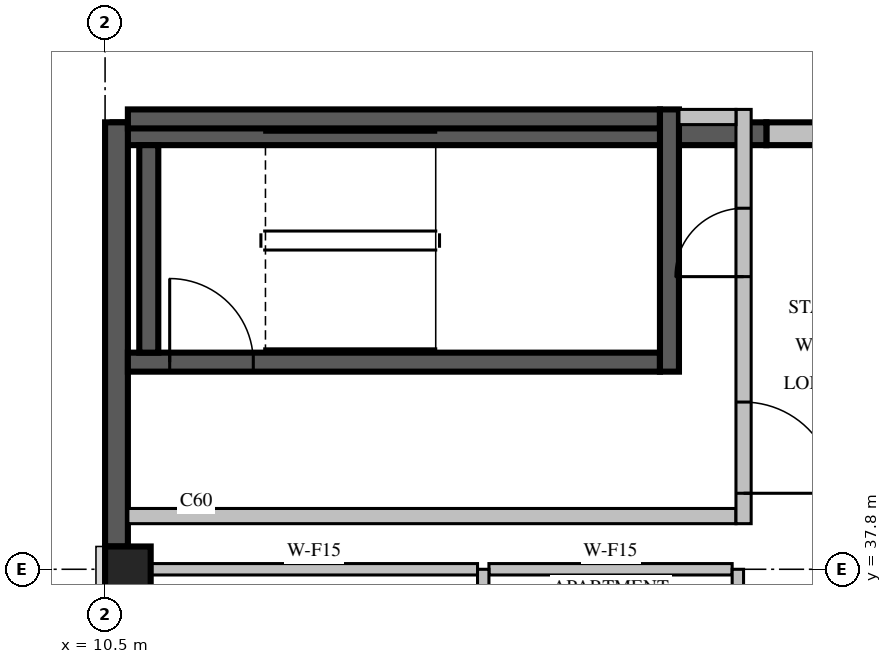
"""IFC4 building model, lengths in metres.
Left out: names, types, materials, properties, quantities, classifications, styles, units other than length and angle.
Written with IfcOpenShell. Run it as: python <this file> out.ifc"""

import sys

from ifc_helpers import new_model, si_unit, direction, frame, frame_2d, origin, origin_2d, place, context, subcontext, project, spatial, rectangle, extrude, source, transform, mapped, element, fill, save


model = new_model("IFC4")
c1 = context("Model", 3, precision=1e-05, world=origin(), true_north=direction((0.0, 1.0)))
c2 = subcontext(c1, "Body", "Model", "MODEL_VIEW")
j1 = project(units=[si_unit("LENGTHUNIT", "METRE"), si_unit("PLANEANGLEUNIT", "RADIAN")], contexts=[c1])
p1 = place(None, origin())
s1 = spatial("IfcSite", under=j1, at=p1, CompositionType="ELEMENT")
p2 = place(p1, origin())
s2 = spatial("IfcBuilding", under=s1, at=p2, CompositionType="ELEMENT")
p3 = place(p2, frame((0.0, 0.0, 365.0)))
s3 = spatial("IfcBuildingStorey", under=s2, at=p3, CompositionType="ELEMENT", Elevation=365.0)
m1 = source(origin(), c2, "Body", "SweptSolid", [
    extrude(rectangle(XDim=0.6, YDim=0.6, at=origin_2d()), origin(), (0.0, 0.0, 1.0), 3.5),
])
p4 = place(p3, frame((10.8, 37.8, 0.0), z_axis=(0.0, 0.0, 1.0), x_axis=(1.0, 0.0, 0.0)))
e1 = element("IfcColumn", 1, at=p4, inside=s3, PredefinedType="COLUMN", context=c2, shape_type="MappedRepresentation", body=[
    mapped(m1, transform((0.0, 0.0, 0.0), scale=1.0)),
])
p5 = place(p3, frame((21.0, 43.53, 0.0), z_axis=(0.0, 0.0, 1.0), x_axis=(-1.0, 0.0, 0.0)))
e2 = element("IfcWall", 2, at=p5, inside=s3, PredefinedType="STANDARD", context=c2, shape_type="SweptSolid", body=[
    extrude(rectangle(XDim=1.8, YDim=0.3, at=frame_2d((0.9, 0.0))), origin(), (0.0, 0.0, 1.0), 3.05),
])
p6 = place(p3, frame((19.2, 43.53, 0.0), z_axis=(0.0, 0.0, 1.0), x_axis=(-1.0, 0.0, 0.0)))
e3 = element("IfcWall", 3, at=p6, inside=s3, PredefinedType="SOLIDWALL", context=c2, shape_type="SweptSolid", body=[
    extrude(rectangle(XDim=8.6, YDim=0.3, at=frame_2d((4.3, 0.0))), origin(), (0.0, 0.0, 1.0), 3.05),
])
p7 = place(p3, frame((10.65, 43.68, 0.0), z_axis=(0.0, 0.0, 1.0), x_axis=(0.0, -1.0, 0.0)))
e4 = element("IfcWall", 4, at=p7, inside=s3, PredefinedType="SOLIDWALL", context=c2, shape_type="SweptSolid", body=[
    extrude(rectangle(XDim=5.58, YDim=0.3, at=frame_2d((2.79, 0.0))), origin(), (0.0, 0.0, 1.0), 3.05),
])
m2 = source(origin(), c2, "Body", "SweptSolid", [
    extrude(rectangle(XDim=7.0, YDim=0.25, at=frame_2d((3.5, 0.0))), origin(), (0.0, 0.0, 1.0), 3.05),
])
p8 = place(p3, frame((10.8, 40.525, 0.0), z_axis=(0.0, 0.0, 1.0), x_axis=(1.0, 0.0, 0.0)))
e5 = element("IfcWall", 5, at=p8, inside=s3, PredefinedType="SOLIDWALL", context=c2, shape_type="MappedRepresentation", body=[
    mapped(m2, transform((0.0, 0.0, 0.0), scale=1.0)),
])
m3 = source(origin(), c2, "Body", "SweptSolid", [
    extrude(rectangle(XDim=1.1, YDim=2.1, at=frame_2d((0.55, 1.05))), frame((0.0, 0.135, 0.0), z_axis=(0.0, -1.0, 0.0), x_axis=(1.0, 0.0, 0.0)), (0.0, 0.0, 1.0), 0.27),
])
p9 = place(p8, frame((0.55, 0.0, 0.0)))
e6 = element("IfcOpeningElement", 6, at=p9, cuts=e5, PredefinedType="OPENING", context=c2, shape_type="MappedRepresentation", body=[
    mapped(m3, transform((0.0, 0.0, 0.0), scale=1.0)),
])
p10 = place(p3, frame((10.8, 43.725, 0.0), z_axis=(0.0, 0.0, 1.0), x_axis=(1.0, 0.0, 0.0)))
e7 = element("IfcWall", 7, at=p10, inside=s3, PredefinedType="SOLIDWALL", context=c2, shape_type="MappedRepresentation", body=[
    mapped(m2, transform((0.0, 0.0, 0.0), scale=1.0)),
])
m4 = source(origin(), c2, "Body", "SweptSolid", [
    extrude(rectangle(XDim=3.45, YDim=0.25, at=frame_2d((1.725, 0.0))), origin(), (0.0, 0.0, 1.0), 3.05),
])
p11 = place(p3, frame((17.925, 40.4, 0.0), z_axis=(0.0, 0.0, 1.0), x_axis=(0.0, 1.0, 0.0)))
e8 = element("IfcWall", 8, at=p11, inside=s3, PredefinedType="SOLIDWALL", context=c2, shape_type="MappedRepresentation", body=[
    mapped(m4, transform((0.0, 0.0, 0.0), scale=1.0)),
])
p12 = place(p3, frame((11.075, 40.65, 0.0), z_axis=(0.0, 0.0, 1.0), x_axis=(0.0, 1.0, 0.0)))
e9 = element("IfcWall", 9, at=p12, inside=s3, PredefinedType="SOLIDWALL", context=c2, shape_type="SweptSolid", body=[
    extrude(rectangle(XDim=2.73, YDim=0.25, at=frame_2d((1.365, 0.0))), origin(), (0.0, 0.0, 1.0), 3.05),
])
m5 = source(origin(), c2, "Body", "SweptSolid", [
    extrude(rectangle(XDim=8.0, YDim=0.2, at=frame_2d((4.0, 0.0))), origin(), (0.0, 0.0, 1.0), 3.05),
])
p13 = place(p3, frame((10.8, 38.5, 0.0), z_axis=(0.0, 0.0, 1.0), x_axis=(1.0, 0.0, 0.0)))
e10 = element("IfcWall", 10, at=p13, inside=s3, PredefinedType="PARTITIONING", context=c2, shape_type="MappedRepresentation", body=[
    mapped(m5, transform((0.0, 0.0, 0.0), scale=1.0)),
])
m6 = source(origin(), c2, "Body", "SweptSolid", [
    extrude(rectangle(XDim=5.45, YDim=0.2, at=frame_2d((2.725, 0.0))), origin(), (0.0, 0.0, 1.0), 3.05),
])
p14 = place(p3, frame((18.9, 38.4, 0.0), z_axis=(0.0, 0.0, 1.0), x_axis=(0.0, 1.0, 0.0)))
e11 = element("IfcWall", 11, at=p14, inside=s3, PredefinedType="PARTITIONING", context=c2, shape_type="MappedRepresentation", body=[
    mapped(m6, transform((0.0, 0.0, 0.0), scale=1.0)),
])
m7 = source(origin(), c2, "Body", "SweptSolid", [
    extrude(rectangle(XDim=1.2, YDim=2.1, at=frame_2d((0.6, 1.05))), frame((0.0, 0.11, 0.0), z_axis=(0.0, -1.0, 0.0), x_axis=(1.0, 0.0, 0.0)), (0.0, 0.0, 1.0), 0.22),
])
p15 = place(p14, frame((0.4, 0.0, 0.0)))
e12 = element("IfcOpeningElement", 12, at=p15, cuts=e11, PredefinedType="OPENING", context=c2, shape_type="MappedRepresentation", body=[
    mapped(m7, transform((0.0, 0.0, 0.0), scale=1.0)),
])
m8 = source(origin(), c2, "Body", "SweptSolid", [
    extrude(rectangle(XDim=0.9, YDim=2.1, at=frame_2d((0.45, 1.05))), frame((0.0, 0.11, 0.0), z_axis=(0.0, -1.0, 0.0), x_axis=(1.0, 0.0, 0.0)), (0.0, 0.0, 1.0), 0.22),
])
p16 = place(p14, frame((3.25, 0.0, 0.0)))
e13 = element("IfcOpeningElement", 13, at=p16, cuts=e11, PredefinedType="OPENING", context=c2, shape_type="MappedRepresentation", body=[
    mapped(m8, transform((0.0, 0.0, 0.0), scale=1.0)),
])
m9 = source(origin(), c2, "Body", "SweptSolid", [
    extrude(rectangle(XDim=0.75, YDim=0.2, at=frame_2d((0.375, 0.0))), origin(), (0.0, 0.0, 1.0), 3.05),
])
p17 = place(p3, frame((18.05, 43.75, 0.0), z_axis=(0.0, 0.0, 1.0), x_axis=(1.0, 0.0, 0.0)))
e14 = element("IfcWall", 14, at=p17, inside=s3, PredefinedType="PARTITIONING", context=c2, shape_type="MappedRepresentation", body=[
    mapped(m9, transform((0.0, 0.0, 0.0), scale=1.0)),
])
m10 = source(origin(), c2, "Body", "SweptSolid", [
    extrude(rectangle(XDim=4.301, YDim=0.15, at=frame_2d((2.151, 0.0))), origin(), (0.0, 0.0, 1.0), 3.05),
])
p18 = place(p3, frame((15.4, 37.8, 0.0), z_axis=(0.0, 0.0, 1.0), x_axis=(-1.0, 0.0, 0.0)))
e15 = element("IfcWall", 15, at=p18, inside=s3, PredefinedType="PARTITIONING", context=c2, shape_type="MappedRepresentation", body=[
    mapped(m10, transform((0.0, 0.0, 0.0), scale=1.0)),
])
m11 = source(origin(), c2, "Body", "SweptSolid", [
    extrude(rectangle(XDim=3.2, YDim=0.15, at=frame_2d((1.6, 0.0))), origin(), (0.0, 0.0, 1.0), 3.05),
])
p19 = place(p3, frame((18.75, 37.8, 0.0), z_axis=(0.0, 0.0, 1.0), x_axis=(-1.0, 0.0, 0.0)))
e16 = element("IfcWall", 16, at=p19, inside=s3, PredefinedType="PARTITIONING", context=c2, shape_type="MappedRepresentation", body=[
    mapped(m11, transform((0.0, 0.0, 0.0), scale=1.0)),
])
m12 = source(origin(), c2, "Body", "SweptSolid", [
    extrude(rectangle(XDim=8.4, YDim=0.15, at=frame_2d((4.2, 0.0))), origin(), (0.0, 0.0, 1.0), 3.05),
])
p20 = place(p3, frame((15.475, 29.4, 0.0), z_axis=(0.0, 0.0, 1.0), x_axis=(0.0, 1.0, 0.0)))
e17 = element("IfcWall", 17, at=p20, inside=s3, PredefinedType="PARTITIONING", context=c2, shape_type="MappedRepresentation", body=[
    mapped(m12, transform((0.0, 0.0, 0.0), scale=1.0)),
])
m13 = source(origin(), c2, "Body", "SweptSolid", [
    extrude(rectangle(XDim=1.0, YDim=2.1, at=frame_2d((0.5, 1.05))), frame((0.0, 0.085, 0.0), z_axis=(0.0, -1.0, 0.0), x_axis=(1.0, 0.0, 0.0)), (0.0, 0.0, 1.0), 0.17),
])
p21 = place(p20, frame((3.068, 0.0, 0.0)))
e18 = element("IfcOpeningElement", 18, at=p21, cuts=e17, PredefinedType="OPENING", context=c2, shape_type="MappedRepresentation", body=[
    mapped(m13, transform((0.0, 0.0, 0.0), scale=1.0)),
])
m14 = source(origin(), c2, "Body", "SweptSolid", [
    extrude(rectangle(XDim=0.9, YDim=2.1, at=frame_2d((0.45, 1.05))), frame((0.0, 0.085, 0.0), z_axis=(0.0, -1.0, 0.0), x_axis=(1.0, 0.0, 0.0)), (0.0, 0.0, 1.0), 0.17),
])
p22 = place(p20, frame((1.067, 0.0, 0.0)))
e19 = element("IfcOpeningElement", 19, at=p22, cuts=e17, PredefinedType="OPENING", context=c2, shape_type="MappedRepresentation", body=[
    mapped(m14, transform((0.0, 0.0, 0.0), scale=1.0)),
])
p23 = place(p20, frame((7.252, 0.0, 0.0)))
e20 = element("IfcOpeningElement", 20, at=p23, cuts=e17, PredefinedType="OPENING", context=c2, shape_type="MappedRepresentation", body=[
    mapped(m14, transform((0.0, 0.0, 0.0), scale=1.0)),
])
p24 = place(p3, frame((18.825, 29.4, 0.0), z_axis=(0.0, 0.0, 1.0), x_axis=(0.0, 1.0, 0.0)))
e21 = element("IfcWall", 21, at=p24, inside=s3, PredefinedType="PARTITIONING", context=c2, shape_type="MappedRepresentation", body=[
    mapped(m12, transform((0.0, 0.0, 0.0), scale=1.0)),
])
p25 = place(p24, frame((3.467, 0.0, 0.0)))
e22 = element("IfcOpeningElement", 22, at=p25, cuts=e21, PredefinedType="OPENING", context=c2, shape_type="MappedRepresentation", body=[
    mapped(m13, transform((0.0, 0.0, 0.0), scale=1.0)),
])
m15 = source(origin(), c2, "Body", "SweptSolid", [
    extrude(rectangle(XDim=1.1, YDim=2.1, at=frame_2d((0.55, 1.05))), frame((0.0, 0.025, 0.0), z_axis=(0.0, -1.0, 0.0), x_axis=(1.0, 0.0, 0.0)), (0.0, 0.0, 1.0), 0.05),
])
p26 = place(p9, origin())
e23 = element("IfcDoor", 23, at=p26, inside=s3, OperationType="SINGLE_SWING_LEFT", PredefinedType="DOOR", context=c2, shape_type="MappedRepresentation", body=[
    mapped(m15, transform((0.0, 0.0, 0.0), scale=1.0)),
])
fill(e6, e23)
m16 = source(origin(), c2, "Body", "SweptSolid", [
    extrude(rectangle(XDim=1.2, YDim=2.1, at=frame_2d((0.6, 1.05))), frame((0.0, 0.025, 0.0), z_axis=(0.0, -1.0, 0.0), x_axis=(1.0, 0.0, 0.0)), (0.0, 0.0, 1.0), 0.05),
])
p27 = place(p15, origin())
e24 = element("IfcDoor", 24, at=p27, inside=s3, OperationType="SINGLE_SWING_RIGHT", PredefinedType="DOOR", context=c2, shape_type="MappedRepresentation", body=[
    mapped(m16, transform((0.0, 0.0, 0.0), scale=1.0)),
])
fill(e12, e24)
m17 = source(origin(), c2, "Body", "SweptSolid", [
    extrude(rectangle(XDim=0.9, YDim=2.1, at=frame_2d((0.45, 1.05))), frame((0.0, 0.025, 0.0), z_axis=(0.0, -1.0, 0.0), x_axis=(1.0, 0.0, 0.0)), (0.0, 0.0, 1.0), 0.05),
])
p28 = place(p16, origin())
e25 = element("IfcDoor", 25, at=p28, inside=s3, OperationType="SINGLE_SWING_LEFT", PredefinedType="DOOR", context=c2, shape_type="MappedRepresentation", body=[
    mapped(m17, transform((0.0, 0.0, 0.0), scale=1.0)),
])
fill(e13, e25)
save(model, sys.argv[1])
